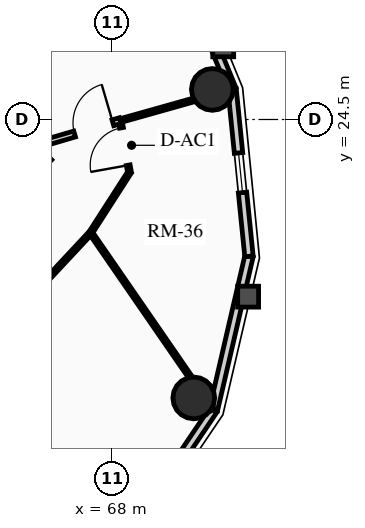
"""IFC4 building model, lengths in metres.
Left out: names, types, materials, properties, quantities, classifications, styles, units other than length and angle.
Written with IfcOpenShell. Run it as: python <this file> out.ifc"""

import sys

from ifc_helpers import new_model, si_unit, direction, frame, frame_2d, origin, origin_2d, place, context, subcontext, project, spatial, rectangle, circle, extrude, source, transform, mapped, element, fill, save


model = new_model("IFC4")
c1 = context("Model", 3, precision=1e-05, world=origin(), true_north=direction((0.0, 1.0)))
c2 = subcontext(c1, "Body", "Model", "MODEL_VIEW")
j1 = project(units=[si_unit("LENGTHUNIT", "METRE"), si_unit("PLANEANGLEUNIT", "RADIAN")], contexts=[c1])
p1 = place(None, origin())
s1 = spatial("IfcSite", under=j1, at=p1, CompositionType="ELEMENT")
p2 = place(p1, origin())
s2 = spatial("IfcBuilding", under=s1, at=p2, CompositionType="ELEMENT")
p3 = place(p2, frame((0.0, 0.0, 229.25)))
s3 = spatial("IfcBuildingStorey", under=s2, at=p3, CompositionType="ELEMENT", Elevation=229.25)
for number, where, z_axis, x_axis in (
    (1, (70.146, 17.173, 0.0), (0.0, 0.0, 1.0), (1.0, 0.0, 0.0)),
    (2, (70.635, 25.291, 0.0), (0.0, 0.0, 1.0), (1.0, 0.0, 0.0)),
):
    element("IfcColumn", number, at=place(p3, frame(where, z_axis=z_axis, x_axis=x_axis)), inside=s3, PredefinedType="USERDEFINED", context=c2, shape_type="SweptSolid", body=[
        extrude(circle(Radius=0.55, at=origin_2d()), origin(), (0.0, 0.0, 1.0), 3.2),
    ])
p4 = place(p3, frame((70.663, 16.856, 0.0), z_axis=(0.0, 0.0, 1.0), x_axis=(-0.559495003079, -0.828833723692, 0.0)))
e3 = element("IfcWall", 3, at=p4, inside=s3, PredefinedType="SOLIDWALL", context=c2, shape_type="SweptSolid", body=[
    extrude(rectangle(XDim=3.976, YDim=0.22, at=frame_2d((1.988, 0.0))), origin(), (0.0, 0.0, 1.0), 2.612),
])
m1 = source(origin(), c2, "Body", "SweptSolid", [
    extrude(rectangle(XDim=1.05, YDim=1.3, at=frame_2d((0.525, 0.65))), frame((0.0, 0.12, 0.0), z_axis=(0.0, -1.0, 0.0), x_axis=(1.0, 0.0, 0.0)), (0.0, 0.0, 1.0), 0.24),
])
p5 = place(p4, frame((1.463, 0.0, 0.65)))
e4 = element("IfcOpeningElement", 4, at=p5, cuts=e3, PredefinedType="OPENING", context=c2, shape_type="MappedRepresentation", body=[
    mapped(m1, transform((0.0, 0.0, 0.0), x_axis=(1.0, 0.0, 0.0), y_axis=(0.0, 1.0, 0.0), z_axis=(0.0, 0.0, 1.0), scale=1.0)),
])
p6 = place(p3, frame((71.599, 20.9, 0.0), z_axis=(0.0, 0.0, 1.0), x_axis=(-0.225473813158, -0.974249228678, 0.0)))
e5 = element("IfcWall", 5, at=p6, inside=s3, PredefinedType="SOLIDWALL", context=c2, shape_type="SweptSolid", body=[
    extrude(rectangle(XDim=4.15, YDim=0.22, at=frame_2d((2.075, 0.0))), origin(), (0.0, 0.0, 1.0), 2.612),
])
p7 = place(p3, frame((71.155, 25.295, 0.0), z_axis=(0.0, 0.0, 1.0), x_axis=(0.100570534541, -0.994929930991, 0.0)))
e6 = element("IfcWall", 6, at=p7, inside=s3, PredefinedType="SOLIDWALL", context=c2, shape_type="SweptSolid", body=[
    extrude(rectangle(XDim=4.418, YDim=0.22, at=frame_2d((2.209, 0.0))), origin(), (0.0, 0.0, 1.0), 2.612),
])
p8 = place(p7, frame((1.684, 0.0, 0.65)))
e7 = element("IfcOpeningElement", 7, at=p8, cuts=e6, PredefinedType="OPENING", context=c2, shape_type="MappedRepresentation", body=[
    mapped(m1, transform((0.0, 0.0, 0.0), x_axis=(1.0, 0.0, 0.0), y_axis=(0.0, 1.0, 0.0), z_axis=(0.0, 0.0, 1.0), scale=1.0)),
])
p9 = place(p3, frame((69.374, 29.613, 0.0), z_axis=(0.0, 0.0, 1.0), x_axis=(0.381309704956, -0.924447353237, 0.0)))
e8 = element("IfcWall", 8, at=p9, inside=s3, PredefinedType="SOLIDWALL", context=c2, shape_type="SweptSolid", body=[
    extrude(rectangle(XDim=4.671, YDim=0.22, at=frame_2d((2.335, 0.0))), origin(), (0.0, 0.0, 1.0), 2.612),
])
p10 = place(p3, frame((62.903, 16.667, 0.0), z_axis=(0.0, 0.0, 1.0), x_axis=(0.682371947497, 0.731005147225, 0.0)))
e9 = element("IfcWall", 9, at=p10, inside=s3, PredefinedType="MOVABLE", context=c2, shape_type="SweptSolid", body=[
    extrude(rectangle(XDim=6.642, YDim=0.1, at=frame_2d((3.321, 0.0))), origin(), (0.0, 0.0, 1.0), 2.545),
])
m2 = source(origin(), c2, "Body", "SweptSolid", [
    extrude(rectangle(XDim=1.05, YDim=2.015, at=frame_2d((0.525, 1.007))), frame((0.0, 0.06, 0.0), z_axis=(0.0, -1.0, 0.0), x_axis=(1.0, 0.0, 0.0)), (0.0, 0.0, 1.0), 0.12),
])
p11 = place(p10, frame((2.796, 0.0, 0.0)))
e10 = element("IfcOpeningElement", 10, at=p11, cuts=e9, PredefinedType="OPENING", context=c2, shape_type="MappedRepresentation", body=[
    mapped(m2, transform((0.0, 0.0, 0.0), x_axis=(1.0, 0.0, 0.0), y_axis=(0.0, 1.0, 0.0), z_axis=(0.0, 0.0, 1.0), scale=1.0)),
])
p12 = place(p3, frame((67.435, 21.521, 0.0), z_axis=(0.0, 0.0, 1.0), x_axis=(0.540777197838, 0.841165870859, 0.0)))
e11 = element("IfcWall", 11, at=p12, inside=s3, PredefinedType="MOVABLE", context=c2, shape_type="SweptSolid", body=[
    extrude(rectangle(XDim=1.888, YDim=0.1, at=frame_2d((0.944, 0.0))), origin(), (0.0, 0.0, 1.0), 2.545),
])
p13 = place(p3, frame((68.456, 23.11, 0.0), z_axis=(0.0, 0.0, 1.0), x_axis=(-0.1772522795, 0.984165448191, 0.0)))
e12 = element("IfcWall", 12, at=p13, inside=s3, PredefinedType="MOVABLE", context=c2, shape_type="SweptSolid", body=[
    extrude(rectangle(XDim=1.382, YDim=0.1, at=frame_2d((0.691, 0.0))), origin(), (0.0, 0.0, 1.0), 2.612),
])
m3 = source(origin(), c2, "Body", "SweptSolid", [
    extrude(rectangle(XDim=1.0, YDim=2.015, at=frame_2d((0.5, 1.007))), frame((0.0, 0.06, 0.0), z_axis=(0.0, -1.0, 0.0), x_axis=(1.0, 0.0, 0.0)), (0.0, 0.0, 1.0), 0.12),
])
p14 = place(p13, frame((0.191, 0.0, 0.0)))
e13 = element("IfcOpeningElement", 13, at=p14, cuts=e12, PredefinedType="OPENING", context=c2, shape_type="MappedRepresentation", body=[
    mapped(m3, transform((0.0, 0.0, 0.0), x_axis=(1.0, 0.0, 0.0), y_axis=(0.0, 1.0, 0.0), z_axis=(0.0, 0.0, 1.0), scale=1.0)),
])
p15 = place(p3, frame((67.435, 21.521, 0.0), z_axis=(0.0, 0.0, 1.0), x_axis=(0.567700677576, -0.823235045828, 0.0)))
e14 = element("IfcWall", 14, at=p15, inside=s3, PredefinedType="MOVABLE", context=c2, shape_type="SweptSolid", body=[
    extrude(rectangle(XDim=5.656, YDim=0.1, at=frame_2d((2.828, 0.0))), origin(), (0.0, 0.0, 1.0), 2.612),
])
p16 = place(p3, frame((68.211, 24.469, 0.0), z_axis=(0.0, 0.0, 1.0), x_axis=(0.962605107736, 0.270908483735, 0.0)))
e15 = element("IfcWall", 15, at=p16, inside=s3, PredefinedType="MOVABLE", context=c2, shape_type="SweptSolid", body=[
    extrude(rectangle(XDim=3.038, YDim=0.1, at=frame_2d((1.519, 0.0))), origin(), (0.0, 0.0, 1.0), 2.612),
])
p17 = place(p3, frame((66.021, 23.828, 0.0), z_axis=(0.0, 0.0, 1.0), x_axis=(0.959727558294, 0.280932400856, 0.0)))
e16 = element("IfcWall", 16, at=p17, inside=s3, PredefinedType="PARTITIONING", context=c2, shape_type="SweptSolid", body=[
    extrude(rectangle(XDim=2.282, YDim=0.16, at=frame_2d((1.141, 0.0))), origin(), (0.0, 0.0, 1.0), 2.545),
])
m4 = source(origin(), c2, "Body", "SweptSolid", [
    extrude(rectangle(XDim=1.05, YDim=2.015, at=frame_2d((0.525, 1.007))), frame((0.0, 0.09, 0.0), z_axis=(0.0, -1.0, 0.0), x_axis=(1.0, 0.0, 0.0)), (0.0, 0.0, 1.0), 0.18),
])
p18 = place(p17, frame((1.032, 0.0, 0.0)))
e17 = element("IfcOpeningElement", 17, at=p18, cuts=e16, PredefinedType="OPENING", context=c2, shape_type="MappedRepresentation", body=[
    mapped(m4, transform((0.0, 0.0, 0.0), x_axis=(1.0, 0.0, 0.0), y_axis=(0.0, 1.0, 0.0), z_axis=(0.0, 0.0, 1.0), scale=1.0)),
])
m5 = source(origin(), c2, "Body", "SweptSolid", [
    extrude(rectangle(XDim=1.05, YDim=1.3, at=frame_2d((0.525, 0.65))), frame((0.0, 0.03, 0.0), z_axis=(0.0, -1.0, 0.0), x_axis=(1.0, 0.0, 0.0)), (0.0, 0.0, 1.0), 0.06),
])
p19 = place(p8, origin())
e18 = element("IfcWindow", 18, at=p19, inside=s3, PartitioningType="SINGLE_PANEL", PredefinedType="WINDOW", context=c2, shape_type="MappedRepresentation", body=[
    mapped(m5, transform((0.0, 0.0, 0.0), x_axis=(1.0, 0.0, 0.0), y_axis=(0.0, 1.0, 0.0), z_axis=(0.0, 0.0, 1.0), scale=1.0)),
])
fill(e7, e18)
m6 = source(origin(), c2, "Body", "SweptSolid", [
    extrude(rectangle(XDim=1.05, YDim=2.015, at=frame_2d((0.525, 1.007))), frame((0.0, 0.025, 0.0), z_axis=(0.0, -1.0, 0.0), x_axis=(1.0, 0.0, 0.0)), (0.0, 0.0, 1.0), 0.05),
])
p20 = place(p18, origin())
e19 = element("IfcDoor", 19, at=p20, inside=s3, OperationType="SINGLE_SWING_RIGHT", PredefinedType="DOOR", context=c2, shape_type="MappedRepresentation", body=[
    mapped(m6, transform((0.0, 0.0, 0.0), x_axis=(1.0, 0.0, 0.0), y_axis=(0.0, 1.0, 0.0), z_axis=(0.0, 0.0, 1.0), scale=1.0)),
])
fill(e17, e19)
m7 = source(origin(), c2, "Body", "SweptSolid", [
    extrude(rectangle(XDim=1.0, YDim=2.015, at=frame_2d((0.5, 1.007))), frame((0.0, 0.025, 0.0), z_axis=(0.0, -1.0, 0.0), x_axis=(1.0, 0.0, 0.0)), (0.0, 0.0, 1.0), 0.05),
])
p21 = place(p14, origin())
e20 = element("IfcDoor", 20, at=p21, inside=s3, OperationType="SINGLE_SWING_LEFT", PredefinedType="DOOR", context=c2, shape_type="MappedRepresentation", body=[
    mapped(m7, transform((0.0, 0.0, 0.0), x_axis=(1.0, 0.0, 0.0), y_axis=(0.0, 1.0, 0.0), z_axis=(0.0, 0.0, 1.0), scale=1.0)),
])
fill(e13, e20)
save(model, sys.argv[1])
